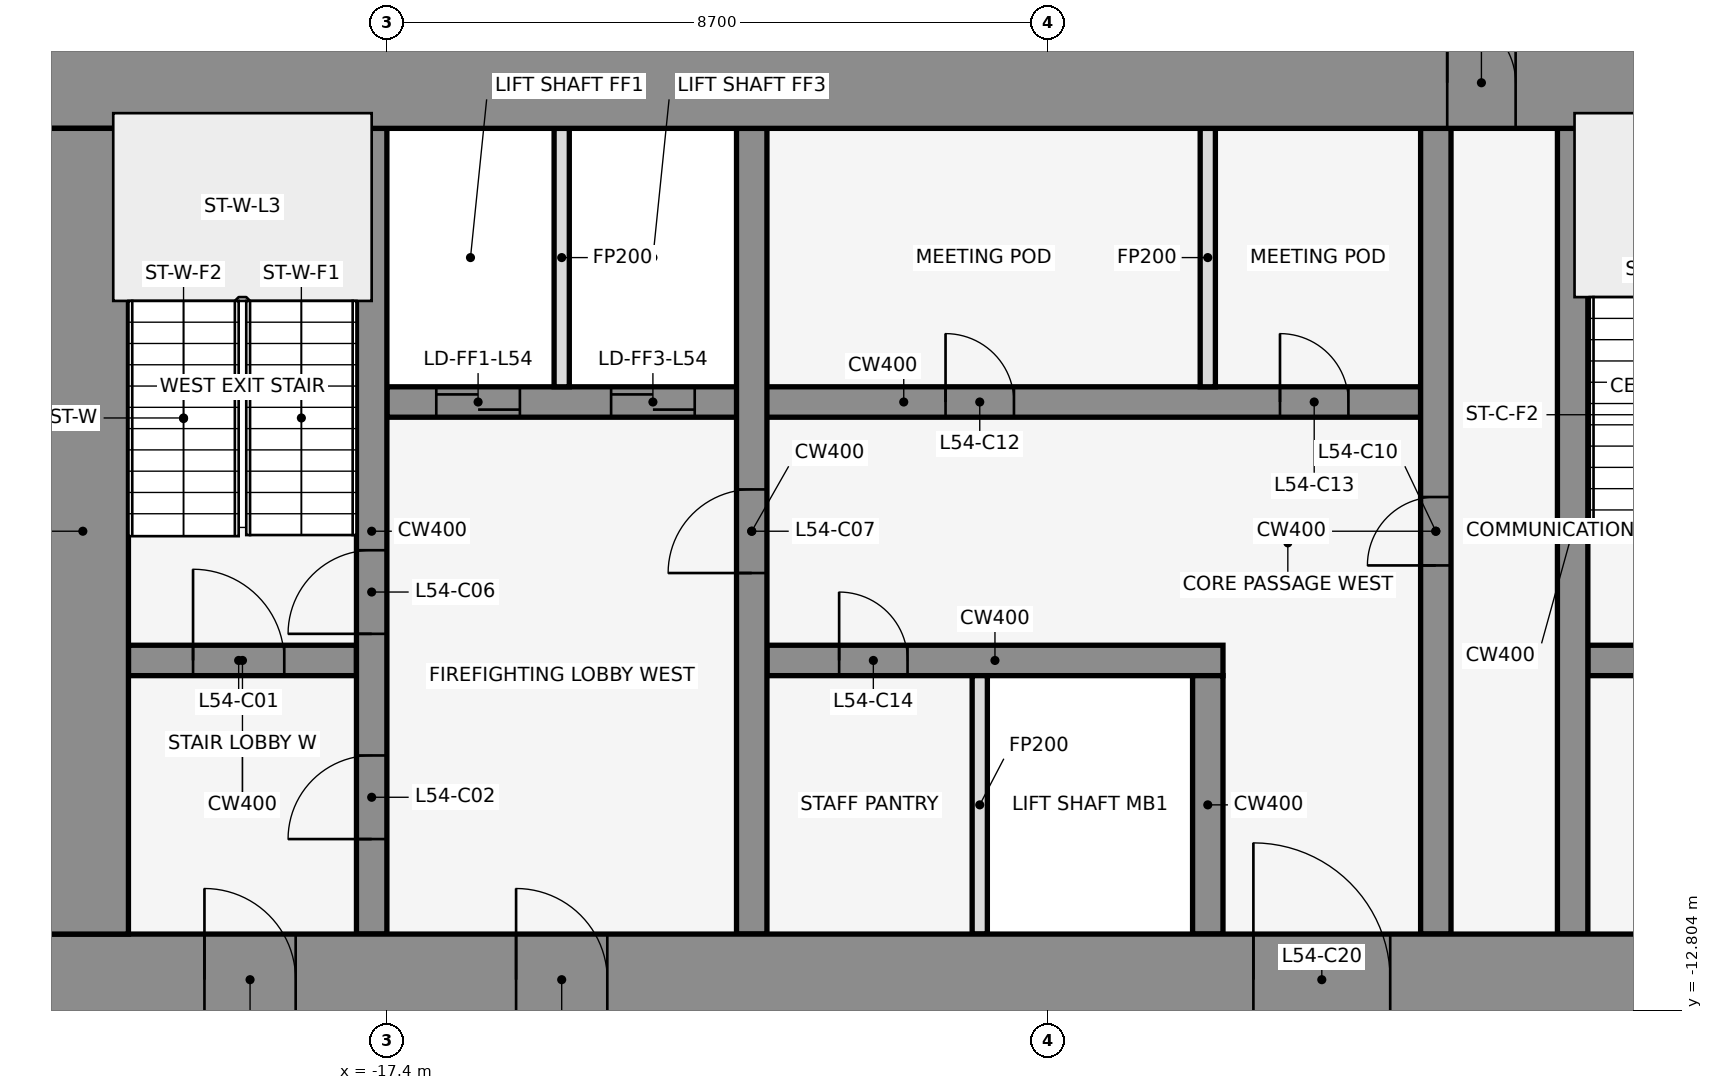
"""IFC4 building model, lengths in metres.
Left out: names, types, materials, properties, quantities, classifications, styles, units other than length and angle.
Written with IfcOpenShell. Run it as: python <this file> out.ifc"""

import sys

from ifc_helpers import new_model, si_unit, direction, frame, frame_2d, origin, place, context, subcontext, project, spatial, rectangle, extrude, element, fill, save


model = new_model("IFC4")
c1 = context("Model", 3, precision=1e-05, world=origin(), true_north=direction((0.0, 1.0)))
c2 = subcontext(c1, "Body", "Model", "MODEL_VIEW")
j1 = project(units=[si_unit("LENGTHUNIT", "METRE"), si_unit("PLANEANGLEUNIT", "RADIAN")], contexts=[c1])
p1 = place(None, origin())
s1 = spatial("IfcSite", under=j1, at=p1, CompositionType="ELEMENT")
p2 = place(p1, origin())
s2 = spatial("IfcBuilding", under=s1, at=p2, CompositionType="ELEMENT")
p3 = place(p2, frame((0.0, 0.0, 241.4)))
s3 = spatial("IfcBuildingStorey", under=s2, at=p3, CompositionType="ELEMENT", Elevation=241.4)
for number, where, z_axis, x_axis in (
    (1, (-0.068, -0.105, 0.0), (0.0, 0.0, 1.0), (-0.84, 0.543, 0.0)),
    (2, (-14.599, 1.08, 0.0), (0.0, 0.0, 1.0), (-0.84, -0.543, 0.0)),
):
    element("IfcWall", number, at=place(p3, frame(where, z_axis=z_axis, x_axis=x_axis)), inside=s3, PredefinedType="STANDARD", context=c2, shape_type="SweptSolid", body=[
        extrude(rectangle(XDim=2.183, YDim=0.25, at=frame_2d((1.091, 0.0))), origin(), (0.0, 0.0, 1.0), 4.05),
    ])
p4 = place(p3, frame((-20.8, -8.2, 0.0), z_axis=(0.0, 0.0, 1.0), x_axis=(1.0, 0.0, 0.0)))
e3 = element("IfcWall", 3, at=p4, inside=s3, PredefinedType="SHEAR", context=c2, shape_type="SweptSolid", body=[
    extrude(rectangle(XDim=3.0, YDim=0.4, at=frame_2d((1.5, 0.0))), origin(), (0.0, 0.0, 1.0), 4.2),
])
p5 = place(p4, frame((0.85, 0.0, 0.0)))
e4 = element("IfcOpeningElement", 4, at=p5, cuts=e3, PredefinedType="OPENING", context=c2, shape_type="SweptSolid", body=[
    extrude(rectangle(XDim=1.2, YDim=2.1, at=frame_2d((0.6, 1.05))), frame((0.0, 0.212, 0.0), z_axis=(0.0, -1.0, 0.0), x_axis=(1.0, 0.0, 0.0)), (0.0, 0.0, 1.0), 0.424),
])
p6 = place(p3, frame((-12.4, -8.2, 0.0), z_axis=(0.0, 0.0, 1.0), x_axis=(1.0, 0.0, 0.0)))
e5 = element("IfcWall", 5, at=p6, inside=s3, PredefinedType="SHEAR", context=c2, shape_type="SweptSolid", body=[
    extrude(rectangle(XDim=6.0, YDim=0.4, at=frame_2d((3.0, 0.0))), origin(), (0.0, 0.0, 1.0), 4.2),
])
p7 = place(p6, frame((0.95, 0.0, 0.0)))
e6 = element("IfcOpeningElement", 6, at=p7, cuts=e5, PredefinedType="OPENING", context=c2, shape_type="SweptSolid", body=[
    extrude(rectangle(XDim=0.9, YDim=2.1, at=frame_2d((0.45, 1.05))), frame((0.0, 0.212, 0.0), z_axis=(0.0, -1.0, 0.0), x_axis=(1.0, 0.0, 0.0)), (0.0, 0.0, 1.0), 0.424),
])
p8 = place(p3, frame((-1.6, -8.2, 0.0), z_axis=(0.0, 0.0, 1.0), x_axis=(1.0, 0.0, 0.0)))
e7 = element("IfcWall", 7, at=p8, inside=s3, PredefinedType="SHEAR", context=c2, shape_type="SweptSolid", body=[
    extrude(rectangle(XDim=3.2, YDim=0.4, at=frame_2d((1.6, 0.0))), origin(), (0.0, 0.0, 1.0), 4.2),
])
p9 = place(p8, frame((1.05, 0.0, 0.0)))
e8 = element("IfcOpeningElement", 8, at=p9, cuts=e7, PredefinedType="OPENING", context=c2, shape_type="SweptSolid", body=[
    extrude(rectangle(XDim=1.2, YDim=2.1, at=frame_2d((0.6, 1.05))), frame((0.0, 0.212, 0.0), z_axis=(0.0, -1.0, 0.0), x_axis=(1.0, 0.0, 0.0)), (0.0, 0.0, 1.0), 0.424),
])
p10 = place(p3, frame((-17.4, -4.8, 0.0), z_axis=(0.0, 0.0, 1.0), x_axis=(1.0, 0.0, 0.0)))
e9 = element("IfcWall", 9, at=p10, inside=s3, PredefinedType="SHEAR", context=c2, shape_type="SweptSolid", body=[
    extrude(rectangle(XDim=13.6, YDim=0.4, at=frame_2d((6.8, 0.0))), origin(), (0.0, 0.0, 1.0), 4.2),
])
p11 = place(p10, frame((0.65, 0.0, 0.0)))
e10 = element("IfcOpeningElement", 10, at=p11, cuts=e9, PredefinedType="OPENING", context=c2, shape_type="SweptSolid", body=[
    extrude(rectangle(XDim=1.1, YDim=2.1, at=frame_2d((0.55, 1.05))), frame((0.0, 0.212, 0.0), z_axis=(0.0, -1.0, 0.0), x_axis=(1.0, 0.0, 0.0)), (0.0, 0.0, 1.0), 0.424),
])
p12 = place(p10, frame((2.95, 0.0, 0.0)))
e11 = element("IfcOpeningElement", 11, at=p12, cuts=e9, PredefinedType="OPENING", context=c2, shape_type="SweptSolid", body=[
    extrude(rectangle(XDim=1.1, YDim=2.1, at=frame_2d((0.55, 1.05))), frame((0.0, 0.212, 0.0), z_axis=(0.0, -1.0, 0.0), x_axis=(1.0, 0.0, 0.0)), (0.0, 0.0, 1.0), 0.424),
])
p13 = place(p10, frame((7.35, 0.0, 0.0)))
e12 = element("IfcOpeningElement", 12, at=p13, cuts=e9, PredefinedType="OPENING", context=c2, shape_type="SweptSolid", body=[
    extrude(rectangle(XDim=0.9, YDim=2.1, at=frame_2d((0.45, 1.05))), frame((0.0, 0.212, 0.0), z_axis=(0.0, -1.0, 0.0), x_axis=(1.0, 0.0, 0.0)), (0.0, 0.0, 1.0), 0.424),
])
p14 = place(p10, frame((11.75, 0.0, 0.0)))
e13 = element("IfcOpeningElement", 13, at=p14, cuts=e9, PredefinedType="OPENING", context=c2, shape_type="SweptSolid", body=[
    extrude(rectangle(XDim=0.9, YDim=2.1, at=frame_2d((0.45, 1.05))), frame((0.0, 0.212, 0.0), z_axis=(0.0, -1.0, 0.0), x_axis=(1.0, 0.0, 0.0)), (0.0, 0.0, 1.0), 0.424),
])
p15 = place(p3, frame((-17.6, -11.8, 0.0), z_axis=(0.0, 0.0, 1.0), x_axis=(0.0, 1.0, 0.0)))
e14 = element("IfcWall", 14, at=p15, inside=s3, PredefinedType="SHEAR", context=c2, shape_type="SweptSolid", body=[
    extrude(rectangle(XDim=10.6, YDim=0.4, at=frame_2d((5.3, 0.0))), origin(), (0.0, 0.0, 1.0), 4.2),
])
p16 = place(p15, frame((1.25, 0.0, 0.0)))
e15 = element("IfcOpeningElement", 15, at=p16, cuts=e14, PredefinedType="OPENING", context=c2, shape_type="SweptSolid", body=[
    extrude(rectangle(XDim=1.1, YDim=2.1, at=frame_2d((0.55, 1.05))), frame((0.0, 0.212, 0.0), z_axis=(0.0, -1.0, 0.0), x_axis=(1.0, 0.0, 0.0)), (0.0, 0.0, 1.0), 0.424),
])
p17 = place(p15, frame((3.95, 0.0, 0.0)))
e16 = element("IfcOpeningElement", 16, at=p17, cuts=e14, PredefinedType="OPENING", context=c2, shape_type="SweptSolid", body=[
    extrude(rectangle(XDim=1.1, YDim=2.1, at=frame_2d((0.55, 1.05))), frame((0.0, 0.212, 0.0), z_axis=(0.0, -1.0, 0.0), x_axis=(1.0, 0.0, 0.0)), (0.0, 0.0, 1.0), 0.424),
])
p18 = place(p3, frame((-15.1, -4.6, 0.0), z_axis=(0.0, 0.0, 1.0), x_axis=(0.0, 1.0, 0.0)))
e17 = element("IfcWall", 17, at=p18, inside=s3, PredefinedType="PARTITIONING", context=c2, shape_type="SweptSolid", body=[
    extrude(rectangle(XDim=3.4, YDim=0.2, at=frame_2d((1.7, 0.0))), origin(), (0.0, 0.0, 1.0), 3.118),
])
p19 = place(p3, frame((-12.6, -11.8, 0.0), z_axis=(0.0, 0.0, 1.0), x_axis=(0.0, 1.0, 0.0)))
e18 = element("IfcWall", 18, at=p19, inside=s3, PredefinedType="SHEAR", context=c2, shape_type="SweptSolid", body=[
    extrude(rectangle(XDim=10.6, YDim=0.4, at=frame_2d((5.3, 0.0))), origin(), (0.0, 0.0, 1.0), 4.2),
])
p20 = place(p19, frame((4.75, 0.0, 0.0)))
e19 = element("IfcOpeningElement", 19, at=p20, cuts=e18, PredefinedType="OPENING", context=c2, shape_type="SweptSolid", body=[
    extrude(rectangle(XDim=1.1, YDim=2.1, at=frame_2d((0.55, 1.05))), frame((0.0, 0.212, 0.0), z_axis=(0.0, -1.0, 0.0), x_axis=(1.0, 0.0, 0.0)), (0.0, 0.0, 1.0), 0.424),
])
p21 = place(p3, frame((-9.6, -11.8, 0.0), z_axis=(0.0, 0.0, 1.0), x_axis=(0.0, 1.0, 0.0)))
e20 = element("IfcWall", 20, at=p21, inside=s3, PredefinedType="PARTITIONING", context=c2, shape_type="SweptSolid", body=[
    extrude(rectangle(XDim=3.4, YDim=0.2, at=frame_2d((1.7, 0.0))), origin(), (0.0, 0.0, 1.0), 3.118),
])
p22 = place(p3, frame((-6.6, -11.8, 0.0), z_axis=(0.0, 0.0, 1.0), x_axis=(0.0, 1.0, 0.0)))
e21 = element("IfcWall", 21, at=p22, inside=s3, PredefinedType="SHEAR", context=c2, shape_type="SweptSolid", body=[
    extrude(rectangle(XDim=3.4, YDim=0.4, at=frame_2d((1.7, 0.0))), origin(), (0.0, 0.0, 1.0), 4.2),
])
p23 = place(p3, frame((-6.6, -4.6, 0.0), z_axis=(0.0, 0.0, 1.0), x_axis=(0.0, 1.0, 0.0)))
e22 = element("IfcWall", 22, at=p23, inside=s3, PredefinedType="PARTITIONING", context=c2, shape_type="SweptSolid", body=[
    extrude(rectangle(XDim=3.4, YDim=0.2, at=frame_2d((1.7, 0.0))), origin(), (0.0, 0.0, 1.0), 3.118),
])
p24 = place(p3, frame((-3.6, -11.8, 0.0), z_axis=(0.0, 0.0, 1.0), x_axis=(0.0, 1.0, 0.0)))
e23 = element("IfcWall", 23, at=p24, inside=s3, PredefinedType="SHEAR", context=c2, shape_type="SweptSolid", body=[
    extrude(rectangle(XDim=10.6, YDim=0.4, at=frame_2d((5.3, 0.0))), origin(), (0.0, 0.0, 1.0), 4.2),
])
p25 = place(p24, frame((4.85, 0.0, 0.0)))
e24 = element("IfcOpeningElement", 24, at=p25, cuts=e23, PredefinedType="OPENING", context=c2, shape_type="SweptSolid", body=[
    extrude(rectangle(XDim=0.9, YDim=2.1, at=frame_2d((0.45, 1.05))), frame((0.0, 0.212, 0.0), z_axis=(0.0, -1.0, 0.0), x_axis=(1.0, 0.0, 0.0)), (0.0, 0.0, 1.0), 0.424),
])
p26 = place(p3, frame((-1.8, -11.8, 0.0), z_axis=(0.0, 0.0, 1.0), x_axis=(0.0, 1.0, 0.0)))
e25 = element("IfcWall", 25, at=p26, inside=s3, PredefinedType="SHEAR", context=c2, shape_type="SweptSolid", body=[
    extrude(rectangle(XDim=10.6, YDim=0.4, at=frame_2d((5.3, 0.0))), origin(), (0.0, 0.0, 1.0), 4.2),
])
p27 = place(p3, frame((-22.0, -0.6, 0.0), z_axis=(0.0, 0.0, 1.0), x_axis=(1.0, 0.0, 0.0)))
e26 = element("IfcWall", 26, at=p27, inside=s3, PredefinedType="SHEAR", context=c2, shape_type="SweptSolid", body=[
    extrude(rectangle(XDim=44.0, YDim=1.2, at=frame_2d((22.0, 0.0))), origin(), (0.0, 0.0, 1.0), 4.2),
])
p28 = place(p27, frame((18.55, 0.0, 0.0)))
e27 = element("IfcOpeningElement", 27, at=p28, cuts=e26, PredefinedType="OPENING", context=c2, shape_type="SweptSolid", body=[
    extrude(rectangle(XDim=0.9, YDim=2.1, at=frame_2d((0.45, 1.05))), frame((0.0, 0.612, 0.0), z_axis=(0.0, -1.0, 0.0), x_axis=(1.0, 0.0, 0.0)), (0.0, 0.0, 1.0), 1.224),
])
p29 = place(p27, frame((24.55, 0.0, 0.0)))
e28 = element("IfcOpeningElement", 28, at=p29, cuts=e26, PredefinedType="OPENING", context=c2, shape_type="SweptSolid", body=[
    extrude(rectangle(XDim=0.9, YDim=2.1, at=frame_2d((0.45, 1.05))), frame((0.0, 0.612, 0.0), z_axis=(0.0, -1.0, 0.0), x_axis=(1.0, 0.0, 0.0)), (0.0, 0.0, 1.0), 1.224),
])
p30 = place(p3, frame((-22.0, -12.4, 0.0), z_axis=(0.0, 0.0, 1.0), x_axis=(1.0, 0.0, 0.0)))
e29 = element("IfcWall", 29, at=p30, inside=s3, PredefinedType="SHEAR", context=c2, shape_type="SweptSolid", body=[
    extrude(rectangle(XDim=44.0, YDim=1.2, at=frame_2d((22.0, 0.0))), origin(), (0.0, 0.0, 1.0), 4.2),
])
p31 = place(p30, frame((2.2, 0.0, 0.0)))
e30 = element("IfcOpeningElement", 30, at=p31, cuts=e29, PredefinedType="OPENING", context=c2, shape_type="SweptSolid", body=[
    extrude(rectangle(XDim=1.2, YDim=2.1, at=frame_2d((0.6, 1.05))), frame((0.0, 0.612, 0.0), z_axis=(0.0, -1.0, 0.0), x_axis=(1.0, 0.0, 0.0)), (0.0, 0.0, 1.0), 1.224),
])
p32 = place(p30, frame((21.4, 0.0, 0.0)))
e31 = element("IfcOpeningElement", 31, at=p32, cuts=e29, PredefinedType="OPENING", context=c2, shape_type="SweptSolid", body=[
    extrude(rectangle(XDim=1.2, YDim=2.1, at=frame_2d((0.6, 1.05))), frame((0.0, 0.612, 0.0), z_axis=(0.0, -1.0, 0.0), x_axis=(1.0, 0.0, 0.0)), (0.0, 0.0, 1.0), 1.224),
])
p33 = place(p30, frame((40.6, 0.0, 0.0)))
e32 = element("IfcOpeningElement", 32, at=p33, cuts=e29, PredefinedType="OPENING", context=c2, shape_type="SweptSolid", body=[
    extrude(rectangle(XDim=1.2, YDim=2.1, at=frame_2d((0.6, 1.05))), frame((0.0, 0.612, 0.0), z_axis=(0.0, -1.0, 0.0), x_axis=(1.0, 0.0, 0.0)), (0.0, 0.0, 1.0), 1.224),
])
p34 = place(p30, frame((16.0, 0.0, 0.0)))
e33 = element("IfcOpeningElement", 33, at=p34, cuts=e29, PredefinedType="OPENING", context=c2, shape_type="SweptSolid", body=[
    extrude(rectangle(XDim=1.8, YDim=2.1, at=frame_2d((0.9, 1.05))), frame((0.0, 0.612, 0.0), z_axis=(0.0, -1.0, 0.0), x_axis=(1.0, 0.0, 0.0)), (0.0, 0.0, 1.0), 1.224),
])
p35 = place(p30, frame((6.3, 0.0, 0.0)))
e34 = element("IfcOpeningElement", 34, at=p35, cuts=e29, PredefinedType="OPENING", context=c2, shape_type="SweptSolid", body=[
    extrude(rectangle(XDim=1.2, YDim=2.1, at=frame_2d((0.6, 1.05))), frame((0.0, 0.612, 0.0), z_axis=(0.0, -1.0, 0.0), x_axis=(1.0, 0.0, 0.0)), (0.0, 0.0, 1.0), 1.224),
])
p36 = place(p30, frame((26.2, 0.0, 0.0)))
e35 = element("IfcOpeningElement", 35, at=p36, cuts=e29, PredefinedType="OPENING", context=c2, shape_type="SweptSolid", body=[
    extrude(rectangle(XDim=1.8, YDim=2.1, at=frame_2d((0.9, 1.05))), frame((0.0, 0.612, 0.0), z_axis=(0.0, -1.0, 0.0), x_axis=(1.0, 0.0, 0.0)), (0.0, 0.0, 1.0), 1.224),
])
p37 = place(p30, frame((36.5, 0.0, 0.0)))
e36 = element("IfcOpeningElement", 36, at=p37, cuts=e29, PredefinedType="OPENING", context=c2, shape_type="SweptSolid", body=[
    extrude(rectangle(XDim=1.2, YDim=2.1, at=frame_2d((0.6, 1.05))), frame((0.0, 0.612, 0.0), z_axis=(0.0, -1.0, 0.0), x_axis=(1.0, 0.0, 0.0)), (0.0, 0.0, 1.0), 1.224),
])
p38 = place(p3, frame((-21.4, -11.8, 0.0), z_axis=(0.0, 0.0, 1.0), x_axis=(0.0, 1.0, 0.0)))
e37 = element("IfcWall", 37, at=p38, inside=s3, PredefinedType="SHEAR", context=c2, shape_type="SweptSolid", body=[
    extrude(rectangle(XDim=10.6, YDim=1.2, at=frame_2d((5.3, 0.0))), origin(), (0.0, 0.0, 1.0), 4.2),
])
p39 = place(p5, origin())
e38 = element("IfcDoor", 38, at=p39, inside=s3, OperationType="SINGLE_SWING_LEFT", PredefinedType="DOOR", context=c2, shape_type="SweptSolid", body=[
    extrude(rectangle(XDim=1.2, YDim=2.1, at=frame_2d((0.6, 1.05))), frame((0.0, 0.025, 0.0), z_axis=(0.0, -1.0, 0.0), x_axis=(1.0, 0.0, 0.0)), (0.0, 0.0, 1.0), 0.05),
])
fill(e4, e38)
p40 = place(p16, frame((1.1, 0.0, 0.0), z_axis=(0.0, 0.0, 1.0), x_axis=(-1.0, 0.0, 0.0)))
e39 = element("IfcDoor", 39, at=p40, inside=s3, OperationType="SINGLE_SWING_LEFT", PredefinedType="DOOR", context=c2, shape_type="SweptSolid", body=[
    extrude(rectangle(XDim=1.1, YDim=2.1, at=frame_2d((0.55, 1.05))), frame((0.0, 0.025, 0.0), z_axis=(0.0, -1.0, 0.0), x_axis=(1.0, 0.0, 0.0)), (0.0, 0.0, 1.0), 0.05),
])
fill(e15, e39)
p41 = place(p11, origin())
e40 = element("IfcDoor", 40, at=p41, inside=s3, OperationType="DOUBLE_DOOR_SLIDING", PredefinedType="DOOR", context=c2, shape_type="SweptSolid", body=[
    extrude(rectangle(XDim=1.1, YDim=2.1, at=frame_2d((0.55, 1.05))), frame((0.0, 0.025, 0.0), z_axis=(0.0, -1.0, 0.0), x_axis=(1.0, 0.0, 0.0)), (0.0, 0.0, 1.0), 0.05),
])
fill(e10, e40)
p42 = place(p12, origin())
e41 = element("IfcDoor", 41, at=p42, inside=s3, OperationType="DOUBLE_DOOR_SLIDING", PredefinedType="DOOR", context=c2, shape_type="SweptSolid", body=[
    extrude(rectangle(XDim=1.1, YDim=2.1, at=frame_2d((0.55, 1.05))), frame((0.0, 0.025, 0.0), z_axis=(0.0, -1.0, 0.0), x_axis=(1.0, 0.0, 0.0)), (0.0, 0.0, 1.0), 0.05),
])
fill(e11, e41)
p43 = place(p17, frame((1.1, 0.0, 0.0), z_axis=(0.0, 0.0, 1.0), x_axis=(-1.0, 0.0, 0.0)))
e42 = element("IfcDoor", 42, at=p43, inside=s3, OperationType="SINGLE_SWING_LEFT", PredefinedType="DOOR", context=c2, shape_type="SweptSolid", body=[
    extrude(rectangle(XDim=1.1, YDim=2.1, at=frame_2d((0.55, 1.05))), frame((0.0, 0.025, 0.0), z_axis=(0.0, -1.0, 0.0), x_axis=(1.0, 0.0, 0.0)), (0.0, 0.0, 1.0), 0.05),
])
fill(e16, e42)
p44 = place(p20, origin())
e43 = element("IfcDoor", 43, at=p44, inside=s3, OperationType="SINGLE_SWING_LEFT", PredefinedType="DOOR", context=c2, shape_type="SweptSolid", body=[
    extrude(rectangle(XDim=1.1, YDim=2.1, at=frame_2d((0.55, 1.05))), frame((0.0, 0.025, 0.0), z_axis=(0.0, -1.0, 0.0), x_axis=(1.0, 0.0, 0.0)), (0.0, 0.0, 1.0), 0.05),
])
fill(e19, e43)
p45 = place(p25, frame((0.9, 0.0, 0.0), z_axis=(0.0, 0.0, 1.0), x_axis=(-1.0, 0.0, 0.0)))
e44 = element("IfcDoor", 44, at=p45, inside=s3, OperationType="SINGLE_SWING_LEFT", PredefinedType="DOOR", context=c2, shape_type="SweptSolid", body=[
    extrude(rectangle(XDim=0.9, YDim=2.1, at=frame_2d((0.45, 1.05))), frame((0.0, 0.025, 0.0), z_axis=(0.0, -1.0, 0.0), x_axis=(1.0, 0.0, 0.0)), (0.0, 0.0, 1.0), 0.05),
])
fill(e24, e44)
p46 = place(p13, origin())
e45 = element("IfcDoor", 45, at=p46, inside=s3, OperationType="SINGLE_SWING_RIGHT", PredefinedType="DOOR", context=c2, shape_type="SweptSolid", body=[
    extrude(rectangle(XDim=0.9, YDim=2.1, at=frame_2d((0.45, 1.05))), frame((0.0, 0.025, 0.0), z_axis=(0.0, -1.0, 0.0), x_axis=(1.0, 0.0, 0.0)), (0.0, 0.0, 1.0), 0.05),
])
fill(e12, e45)
p47 = place(p14, origin())
e46 = element("IfcDoor", 46, at=p47, inside=s3, OperationType="SINGLE_SWING_LEFT", PredefinedType="DOOR", context=c2, shape_type="SweptSolid", body=[
    extrude(rectangle(XDim=0.9, YDim=2.1, at=frame_2d((0.45, 1.05))), frame((0.0, 0.025, 0.0), z_axis=(0.0, -1.0, 0.0), x_axis=(1.0, 0.0, 0.0)), (0.0, 0.0, 1.0), 0.05),
])
fill(e13, e46)
p48 = place(p7, frame((0.9, 0.0, 0.0), z_axis=(0.0, 0.0, 1.0), x_axis=(-1.0, 0.0, 0.0)))
e47 = element("IfcDoor", 47, at=p48, inside=s3, OperationType="SINGLE_SWING_LEFT", PredefinedType="DOOR", context=c2, shape_type="SweptSolid", body=[
    extrude(rectangle(XDim=0.9, YDim=2.1, at=frame_2d((0.45, 1.05))), frame((0.0, 0.025, 0.0), z_axis=(0.0, -1.0, 0.0), x_axis=(1.0, 0.0, 0.0)), (0.0, 0.0, 1.0), 0.05),
])
fill(e6, e47)
p49 = place(p28, origin())
e48 = element("IfcDoor", 48, at=p49, inside=s3, OperationType="SINGLE_SWING_LEFT", PredefinedType="DOOR", context=c2, shape_type="SweptSolid", body=[
    extrude(rectangle(XDim=0.9, YDim=2.1, at=frame_2d((0.45, 1.05))), frame((0.0, 0.025, 0.0), z_axis=(0.0, -1.0, 0.0), x_axis=(1.0, 0.0, 0.0)), (0.0, 0.0, 1.0), 0.05),
])
fill(e27, e48)
p50 = place(p31, frame((1.2, 0.0, 0.0), z_axis=(0.0, 0.0, 1.0), x_axis=(-1.0, 0.0, 0.0)))
e49 = element("IfcDoor", 49, at=p50, inside=s3, OperationType="SINGLE_SWING_RIGHT", PredefinedType="DOOR", context=c2, shape_type="SweptSolid", body=[
    extrude(rectangle(XDim=1.2, YDim=2.1, at=frame_2d((0.6, 1.05))), frame((0.0, 0.025, 0.0), z_axis=(0.0, -1.0, 0.0), x_axis=(1.0, 0.0, 0.0)), (0.0, 0.0, 1.0), 0.05),
])
fill(e30, e49)
p51 = place(p34, origin())
e50 = element("IfcDoor", 50, at=p51, inside=s3, OperationType="SINGLE_SWING_LEFT", PredefinedType="DOOR", context=c2, shape_type="SweptSolid", body=[
    extrude(rectangle(XDim=1.8, YDim=2.1, at=frame_2d((0.9, 1.05))), frame((0.0, 0.025, 0.0), z_axis=(0.0, -1.0, 0.0), x_axis=(1.0, 0.0, 0.0)), (0.0, 0.0, 1.0), 0.05),
])
fill(e33, e50)
p52 = place(p35, frame((1.2, 0.0, 0.0), z_axis=(0.0, 0.0, 1.0), x_axis=(-1.0, 0.0, 0.0)))
e51 = element("IfcDoor", 51, at=p52, inside=s3, OperationType="SINGLE_SWING_RIGHT", PredefinedType="DOOR", context=c2, shape_type="SweptSolid", body=[
    extrude(rectangle(XDim=1.2, YDim=2.1, at=frame_2d((0.6, 1.05))), frame((0.0, 0.025, 0.0), z_axis=(0.0, -1.0, 0.0), x_axis=(1.0, 0.0, 0.0)), (0.0, 0.0, 1.0), 0.05),
])
fill(e34, e51)
save(model, sys.argv[1])
